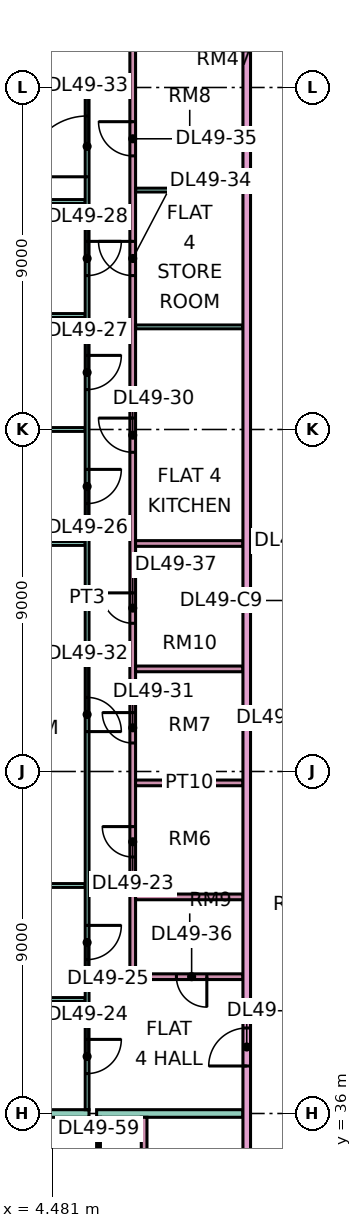
"""IFC4 building model, lengths in metres.
Left out: names, types, materials, properties, quantities, classifications, styles, units other than length and angle.
Written with IfcOpenShell. Run it as: python <this file> out.ifc"""

import sys

from ifc_helpers import new_model, si_unit, direction, frame, frame_2d, origin, place, context, subcontext, project, spatial, rectangle, extrude, element, fill, save


model = new_model("IFC4")
c1 = context("Model", 3, precision=1e-05, world=origin(), true_north=direction((0.0, 1.0)))
c2 = subcontext(c1, "Body", "Model", "MODEL_VIEW")
j1 = project(units=[si_unit("LENGTHUNIT", "METRE"), si_unit("PLANEANGLEUNIT", "RADIAN")], contexts=[c1])
p1 = place(None, origin())
s1 = spatial("IfcSite", under=j1, at=p1, CompositionType="ELEMENT")
p2 = place(p1, origin())
s2 = spatial("IfcBuilding", under=s1, at=p2, CompositionType="ELEMENT")
p3 = place(p2, frame((0.0, 0.0, 211.65)))
s3 = spatial("IfcBuildingStorey", under=s2, at=p3, CompositionType="ELEMENT", Elevation=211.65)
for number, where, z_axis, x_axis in (
    (1, (-1.351, 54.0, 0.0), (0.0, 0.0, 1.0), (1.0, 0.0, 0.0)),
    (2, (-1.351, 57.0, 0.0), (0.0, 0.0, 1.0), (1.0, 0.0, 0.0)),
    (3, (-1.351, 60.0, 0.0), (0.0, 0.0, 1.0), (1.0, 0.0, 0.0)),
):
    element("IfcWall", number, at=place(p3, frame(where, z_axis=z_axis, x_axis=x_axis)), inside=s3, PredefinedType="PARTITIONING", context=c2, shape_type="SweptSolid", body=[
        extrude(rectangle(XDim=6.701, YDim=0.1, at=frame_2d((3.351, 0.0))), origin(), (0.0, 0.0, 1.0), 3.35),
    ])
p4 = place(p3, frame((0.0, 36.0, 0.0), z_axis=(0.0, 0.0, 1.0), x_axis=(1.0, 0.0, 0.0)))
e4 = element("IfcWall", 4, at=p4, inside=s3, PredefinedType="PARTITIONING", context=c2, shape_type="SweptSolid", body=[
    extrude(rectangle(XDim=5.45, YDim=0.2, at=frame_2d((2.725, 0.0))), origin(), (0.0, 0.0, 1.0), 3.35),
])
p5 = place(p3, frame((-1.35, 51.0, 0.0), z_axis=(0.0, 0.0, 1.0), x_axis=(1.0, 0.0, 0.0)))
e5 = element("IfcWall", 5, at=p5, inside=s3, PredefinedType="PARTITIONING", context=c2, shape_type="SweptSolid", body=[
    extrude(rectangle(XDim=6.7, YDim=0.1, at=frame_2d((3.35, 0.0))), origin(), (0.0, 0.0, 1.0), 3.35),
])
for number, where, z_axis, x_axis in (
    (6, (0.074, 39.0, 0.0), (0.0, 0.0, 1.0), (1.0, 0.0, 0.0)),
    (7, (0.074, 42.0, 0.0), (0.0, 0.0, 1.0), (1.0, 0.0, 0.0)),
):
    element("IfcWall", number, at=place(p3, frame(where, z_axis=z_axis, x_axis=x_axis)), inside=s3, PredefinedType="PARTITIONING", context=c2, shape_type="SweptSolid", body=[
        extrude(rectangle(XDim=5.276, YDim=0.1, at=frame_2d((2.638, 0.0))), origin(), (0.0, 0.0, 1.0), 3.35),
    ])
p6 = place(p3, frame((5.4, 36.1, 0.0), z_axis=(0.0, 0.0, 1.0), x_axis=(0.0, 1.0, 0.0)))
e8 = element("IfcWall", 8, at=p6, inside=s3, PredefinedType="PARTITIONING", context=c2, shape_type="SweptSolid", body=[
    extrude(rectangle(XDim=26.95, YDim=0.1, at=frame_2d((13.475, 0.0))), origin(), (0.0, 0.0, 1.0), 3.35),
])
p7 = place(p6, frame((0.95, 0.0, 0.0)))
e9 = element("IfcOpeningElement", 9, at=p7, cuts=e8, PredefinedType="OPENING", context=c2, shape_type="SweptSolid", body=[
    extrude(rectangle(XDim=0.9, YDim=2.1, at=frame_2d((0.45, 1.05))), frame((0.0, 0.06, 0.0), z_axis=(0.0, -1.0, 0.0), x_axis=(1.0, 0.0, 0.0)), (0.0, 0.0, 1.0), 0.12),
])
p8 = place(p6, frame((3.95, 0.0, 0.0)))
e10 = element("IfcOpeningElement", 10, at=p8, cuts=e8, PredefinedType="OPENING", context=c2, shape_type="SweptSolid", body=[
    extrude(rectangle(XDim=0.9, YDim=2.1, at=frame_2d((0.45, 1.05))), frame((0.0, 0.06, 0.0), z_axis=(0.0, -1.0, 0.0), x_axis=(1.0, 0.0, 0.0)), (0.0, 0.0, 1.0), 0.12),
])
p9 = place(p6, frame((15.95, 0.0, 0.0)))
e11 = element("IfcOpeningElement", 11, at=p9, cuts=e8, PredefinedType="OPENING", context=c2, shape_type="SweptSolid", body=[
    extrude(rectangle(XDim=0.9, YDim=2.1, at=frame_2d((0.45, 1.05))), frame((0.0, 0.06, 0.0), z_axis=(0.0, -1.0, 0.0), x_axis=(1.0, 0.0, 0.0)), (0.0, 0.0, 1.0), 0.12),
])
p10 = place(p6, frame((18.95, 0.0, 0.0)))
e12 = element("IfcOpeningElement", 12, at=p10, cuts=e8, PredefinedType="OPENING", context=c2, shape_type="SweptSolid", body=[
    extrude(rectangle(XDim=0.9, YDim=2.1, at=frame_2d((0.45, 1.05))), frame((0.0, 0.06, 0.0), z_axis=(0.0, -1.0, 0.0), x_axis=(1.0, 0.0, 0.0)), (0.0, 0.0, 1.0), 0.12),
])
p11 = place(p6, frame((21.95, 0.0, 0.0)))
e13 = element("IfcOpeningElement", 13, at=p11, cuts=e8, PredefinedType="OPENING", context=c2, shape_type="SweptSolid", body=[
    extrude(rectangle(XDim=0.9, YDim=2.1, at=frame_2d((0.45, 1.05))), frame((0.0, 0.06, 0.0), z_axis=(0.0, -1.0, 0.0), x_axis=(1.0, 0.0, 0.0)), (0.0, 0.0, 1.0), 0.12),
])
p12 = place(p6, frame((9.95, 0.0, 0.0)))
e14 = element("IfcOpeningElement", 14, at=p12, cuts=e8, PredefinedType="OPENING", context=c2, shape_type="SweptSolid", body=[
    extrude(rectangle(XDim=0.9, YDim=2.1, at=frame_2d((0.45, 1.05))), frame((0.0, 0.06, 0.0), z_axis=(0.0, -1.0, 0.0), x_axis=(1.0, 0.0, 0.0)), (0.0, 0.0, 1.0), 0.12),
])
p13 = place(p6, frame((24.55, 0.0, 0.0)))
e15 = element("IfcOpeningElement", 15, at=p13, cuts=e8, PredefinedType="OPENING", context=c2, shape_type="SweptSolid", body=[
    extrude(rectangle(XDim=1.6, YDim=2.1, at=frame_2d((0.8, 1.05))), frame((0.0, 0.06, 0.0), z_axis=(0.0, -1.0, 0.0), x_axis=(1.0, 0.0, 0.0)), (0.0, 0.0, 1.0), 0.12),
])
p14 = place(p3, frame((5.45, 63.0, 0.0), z_axis=(0.0, 0.0, 1.0), x_axis=(1.0, 0.0, 0.0)))
e16 = element("IfcWall", 16, at=p14, inside=s3, PredefinedType="PARTITIONING", context=c2, shape_type="SweptSolid", body=[
    extrude(rectangle(XDim=0.55, YDim=0.1, at=frame_2d((0.275, 0.0))), origin(), (0.0, 0.0, 1.0), 3.35),
])
p15 = place(p3, frame((5.65, 36.0, 0.0), z_axis=(0.0, 0.0, 1.0), x_axis=(1.0, 0.0, 0.0)))
e17 = element("IfcWall", 17, at=p15, inside=s3, PredefinedType="PARTITIONING", context=c2, shape_type="SweptSolid", body=[
    extrude(rectangle(XDim=3.85, YDim=0.2, at=frame_2d((1.925, 0.0))), origin(), (0.0, 0.0, 1.0), 3.35),
])
p16 = place(p3, frame((5.7, 29.95, 0.0), z_axis=(0.0, 0.0, 1.0), x_axis=(0.0, 1.0, 0.0)))
e18 = element("IfcWall", 18, at=p16, inside=s3, PredefinedType="PARTITIONING", context=c2, shape_type="SweptSolid", body=[
    extrude(rectangle(XDim=5.95, YDim=0.1, at=frame_2d((2.975, 0.0))), origin(), (0.0, 0.0, 1.0), 3.35),
])
p17 = place(p16, frame((1.1, 0.0, 0.0)))
e19 = element("IfcOpeningElement", 19, at=p17, cuts=e18, PredefinedType="OPENING", context=c2, shape_type="SweptSolid", body=[
    extrude(rectangle(XDim=0.9, YDim=2.1, at=frame_2d((0.45, 1.05))), frame((0.0, 0.06, 0.0), z_axis=(0.0, -1.0, 0.0), x_axis=(1.0, 0.0, 0.0)), (0.0, 0.0, 1.0), 0.12),
])
p18 = place(p16, frame((4.1, 0.0, 0.0)))
e20 = element("IfcOpeningElement", 20, at=p18, cuts=e18, PredefinedType="OPENING", context=c2, shape_type="SweptSolid", body=[
    extrude(rectangle(XDim=0.9, YDim=2.1, at=frame_2d((0.45, 1.05))), frame((0.0, 0.06, 0.0), z_axis=(0.0, -1.0, 0.0), x_axis=(1.0, 0.0, 0.0)), (0.0, 0.0, 1.0), 0.12),
])
p19 = place(p3, frame((6.6, 39.525, 0.0), z_axis=(0.0, 0.0, 1.0), x_axis=(0.0, 1.0, 0.0)))
e21 = element("IfcWall", 21, at=p19, inside=s3, PredefinedType="PARTITIONING", context=c2, shape_type="SweptSolid", body=[
    extrude(rectangle(XDim=24.825, YDim=0.15, at=frame_2d((12.413, 0.0))), origin(), (0.0, 0.0, 1.0), 3.35),
])
p20 = place(p19, frame((3.225, 0.0, 0.0)))
e22 = element("IfcOpeningElement", 22, at=p20, cuts=e21, PredefinedType="OPENING", context=c2, shape_type="SweptSolid", body=[
    extrude(rectangle(XDim=0.8, YDim=2.1, at=frame_2d((0.4, 1.05))), frame((0.0, 0.085, 0.0), z_axis=(0.0, -1.0, 0.0), x_axis=(1.0, 0.0, 0.0)), (0.0, 0.0, 1.0), 0.17),
])
p21 = place(p19, frame((13.875, 0.0, 0.0)))
e23 = element("IfcOpeningElement", 23, at=p21, cuts=e21, PredefinedType="OPENING", context=c2, shape_type="SweptSolid", body=[
    extrude(rectangle(XDim=0.9, YDim=2.1, at=frame_2d((0.45, 1.05))), frame((0.0, 0.085, 0.0), z_axis=(0.0, -1.0, 0.0), x_axis=(1.0, 0.0, 0.0)), (0.0, 0.0, 1.0), 0.17),
])
p22 = place(p19, frame((6.225, 0.0, 0.0)))
e24 = element("IfcOpeningElement", 24, at=p22, cuts=e21, PredefinedType="OPENING", context=c2, shape_type="SweptSolid", body=[
    extrude(rectangle(XDim=0.8, YDim=2.1, at=frame_2d((0.4, 1.05))), frame((0.0, 0.085, 0.0), z_axis=(0.0, -1.0, 0.0), x_axis=(1.0, 0.0, 0.0)), (0.0, 0.0, 1.0), 0.17),
])
p23 = place(p19, frame((18.525, 0.0, 0.0)))
e25 = element("IfcOpeningElement", 25, at=p23, cuts=e21, PredefinedType="OPENING", context=c2, shape_type="SweptSolid", body=[
    extrude(rectangle(XDim=0.9, YDim=2.1, at=frame_2d((0.45, 1.05))), frame((0.0, 0.085, 0.0), z_axis=(0.0, -1.0, 0.0), x_axis=(1.0, 0.0, 0.0)), (0.0, 0.0, 1.0), 0.17),
])
p24 = place(p19, frame((21.675, 0.0, 0.0)))
e26 = element("IfcOpeningElement", 26, at=p24, cuts=e21, PredefinedType="OPENING", context=c2, shape_type="SweptSolid", body=[
    extrude(rectangle(XDim=0.9, YDim=2.1, at=frame_2d((0.45, 1.05))), frame((0.0, 0.085, 0.0), z_axis=(0.0, -1.0, 0.0), x_axis=(1.0, 0.0, 0.0)), (0.0, 0.0, 1.0), 0.17),
])
p25 = place(p19, frame((9.375, 0.0, 0.0)))
e27 = element("IfcOpeningElement", 27, at=p25, cuts=e21, PredefinedType="OPENING", context=c2, shape_type="SweptSolid", body=[
    extrude(rectangle(XDim=0.8, YDim=2.1, at=frame_2d((0.4, 1.05))), frame((0.0, 0.085, 0.0), z_axis=(0.0, -1.0, 0.0), x_axis=(1.0, 0.0, 0.0)), (0.0, 0.0, 1.0), 0.17),
])
p26 = place(p3, frame((6.675, 39.6, 0.0), z_axis=(0.0, 0.0, 1.0), x_axis=(1.0, 0.0, 0.0)))
e28 = element("IfcWall", 28, at=p26, inside=s3, PredefinedType="PARTITIONING", context=c2, shape_type="SweptSolid", body=[
    extrude(rectangle(XDim=2.825, YDim=0.15, at=frame_2d((1.413, 0.0))), origin(), (0.0, 0.0, 1.0), 3.35),
])
p27 = place(p26, frame((1.075, 0.0, 0.0)))
e29 = element("IfcOpeningElement", 29, at=p27, cuts=e28, PredefinedType="OPENING", context=c2, shape_type="SweptSolid", body=[
    extrude(rectangle(XDim=0.8, YDim=2.1, at=frame_2d((0.4, 1.05))), frame((0.0, 0.085, 0.0), z_axis=(0.0, -1.0, 0.0), x_axis=(1.0, 0.0, 0.0)), (0.0, 0.0, 1.0), 0.17),
])
for number, where, z_axis, x_axis in (
    (30, (6.675, 41.7, 0.0), (0.0, 0.0, 1.0), (1.0, 0.0, 0.0)),
    (31, (6.675, 44.7, 0.0), (0.0, 0.0, 1.0), (1.0, 0.0, 0.0)),
    (32, (6.675, 47.7, 0.0), (0.0, 0.0, 1.0), (1.0, 0.0, 0.0)),
    (33, (6.675, 51.0, 0.0), (0.0, 0.0, 1.0), (1.0, 0.0, 0.0)),
):
    element("IfcWall", number, at=place(p3, frame(where, z_axis=z_axis, x_axis=x_axis)), inside=s3, PredefinedType="PARTITIONING", context=c2, shape_type="SweptSolid", body=[
        extrude(rectangle(XDim=2.825, YDim=0.15, at=frame_2d((1.413, 0.0))), origin(), (0.0, 0.0, 1.0), 3.35),
    ])
for number, where, z_axis, x_axis in (
    (34, (6.675, 56.7, 0.0), (0.0, 0.0, 1.0), (1.0, 0.0, 0.0)),
    (35, (6.675, 60.3, 0.0), (0.0, 0.0, 1.0), (1.0, 0.0, 0.0)),
):
    element("IfcWall", number, at=place(p3, frame(where, z_axis=z_axis, x_axis=x_axis)), inside=s3, PredefinedType="PARTITIONING", context=c2, shape_type="SweptSolid", body=[
        extrude(rectangle(XDim=2.825, YDim=0.1, at=frame_2d((1.413, 0.0))), origin(), (0.0, 0.0, 1.0), 3.35),
    ])
p28 = place(p3, frame((6.9, 27.225, 0.0), z_axis=(0.0, 0.0, 1.0), x_axis=(0.0, 1.0, 0.0)))
e36 = element("IfcWall", 36, at=p28, inside=s3, PredefinedType="PARTITIONING", context=c2, shape_type="SweptSolid", body=[
    extrude(rectangle(XDim=8.675, YDim=0.15, at=frame_2d((4.337, 0.0))), origin(), (0.0, 0.0, 1.0), 3.35),
])
p29 = place(p28, frame((1.125, 0.0, 0.0)))
e37 = element("IfcOpeningElement", 37, at=p29, cuts=e36, PredefinedType="OPENING", context=c2, shape_type="SweptSolid", body=[
    extrude(rectangle(XDim=0.8, YDim=2.1, at=frame_2d((0.4, 1.05))), frame((0.0, 0.085, 0.0), z_axis=(0.0, -1.0, 0.0), x_axis=(1.0, 0.0, 0.0)), (0.0, 0.0, 1.0), 0.17),
])
p30 = place(p28, frame((5.475, 0.0, 0.0)))
e38 = element("IfcOpeningElement", 38, at=p30, cuts=e36, PredefinedType="OPENING", context=c2, shape_type="SweptSolid", body=[
    extrude(rectangle(XDim=0.9, YDim=2.1, at=frame_2d((0.45, 1.05))), frame((0.0, 0.085, 0.0), z_axis=(0.0, -1.0, 0.0), x_axis=(1.0, 0.0, 0.0)), (0.0, 0.0, 1.0), 0.17),
])
p31 = place(p3, frame((9.6, 20.0, 0.0), z_axis=(0.0, 0.0, 1.0), x_axis=(0.0, 1.0, 0.0)))
e39 = element("IfcWall", 39, at=p31, inside=s3, PredefinedType="PARTITIONING", context=c2, shape_type="SweptSolid", body=[
    extrude(rectangle(XDim=44.35, YDim=0.2, at=frame_2d((22.175, 0.0))), origin(), (0.0, 0.0, 1.0), 3.35),
])
p32 = place(p31, frame((17.25, 0.0, 0.0)))
e40 = element("IfcOpeningElement", 40, at=p32, cuts=e39, PredefinedType="OPENING", context=c2, shape_type="SweptSolid", body=[
    extrude(rectangle(XDim=1.0, YDim=2.1, at=frame_2d((0.5, 1.05))), frame((0.0, 0.11, 0.0), z_axis=(0.0, -1.0, 0.0), x_axis=(1.0, 0.0, 0.0)), (0.0, 0.0, 1.0), 0.22),
])
p33 = place(p31, frame((0.6, 0.0, 0.0)))
e41 = element("IfcOpeningElement", 41, at=p33, cuts=e39, PredefinedType="OPENING", context=c2, shape_type="SweptSolid", body=[
    extrude(rectangle(XDim=1.2, YDim=2.1, at=frame_2d((0.6, 1.05))), frame((0.0, 0.11, 0.0), z_axis=(0.0, -1.0, 0.0), x_axis=(1.0, 0.0, 0.0)), (0.0, 0.0, 1.0), 0.22),
])
p34 = place(p31, frame((4.35, 0.0, 0.0)))
e42 = element("IfcOpeningElement", 42, at=p34, cuts=e39, PredefinedType="OPENING", context=c2, shape_type="SweptSolid", body=[
    extrude(rectangle(XDim=1.0, YDim=2.1, at=frame_2d((0.5, 1.05))), frame((0.0, 0.11, 0.0), z_axis=(0.0, -1.0, 0.0), x_axis=(1.0, 0.0, 0.0)), (0.0, 0.0, 1.0), 0.22),
])
p35 = place(p20, frame((0.8, 0.0, 0.0), z_axis=(0.0, 0.0, 1.0), x_axis=(-1.0, 0.0, 0.0)))
e43 = element("IfcDoor", 43, at=p35, inside=s3, OperationType="SINGLE_SWING_RIGHT", PredefinedType="DOOR", context=c2, shape_type="SweptSolid", body=[
    extrude(rectangle(XDim=0.8, YDim=2.1, at=frame_2d((0.4, 1.05))), frame((0.0, 0.025, 0.0), z_axis=(0.0, -1.0, 0.0), x_axis=(1.0, 0.0, 0.0)), (0.0, 0.0, 1.0), 0.05),
])
fill(e22, e43)
p36 = place(p7, origin())
e44 = element("IfcDoor", 44, at=p36, inside=s3, OperationType="SINGLE_SWING_RIGHT", PredefinedType="DOOR", context=c2, shape_type="SweptSolid", body=[
    extrude(rectangle(XDim=0.9, YDim=2.1, at=frame_2d((0.45, 1.05))), frame((0.0, 0.025, 0.0), z_axis=(0.0, -1.0, 0.0), x_axis=(1.0, 0.0, 0.0)), (0.0, 0.0, 1.0), 0.05),
])
fill(e9, e44)
p37 = place(p8, origin())
e45 = element("IfcDoor", 45, at=p37, inside=s3, OperationType="SINGLE_SWING_RIGHT", PredefinedType="DOOR", context=c2, shape_type="SweptSolid", body=[
    extrude(rectangle(XDim=0.9, YDim=2.1, at=frame_2d((0.45, 1.05))), frame((0.0, 0.025, 0.0), z_axis=(0.0, -1.0, 0.0), x_axis=(1.0, 0.0, 0.0)), (0.0, 0.0, 1.0), 0.05),
])
fill(e10, e45)
p38 = place(p9, origin())
e46 = element("IfcDoor", 46, at=p38, inside=s3, OperationType="SINGLE_SWING_RIGHT", PredefinedType="DOOR", context=c2, shape_type="SweptSolid", body=[
    extrude(rectangle(XDim=0.9, YDim=2.1, at=frame_2d((0.45, 1.05))), frame((0.0, 0.025, 0.0), z_axis=(0.0, -1.0, 0.0), x_axis=(1.0, 0.0, 0.0)), (0.0, 0.0, 1.0), 0.05),
])
fill(e11, e46)
p39 = place(p10, origin())
e47 = element("IfcDoor", 47, at=p39, inside=s3, OperationType="SINGLE_SWING_RIGHT", PredefinedType="DOOR", context=c2, shape_type="SweptSolid", body=[
    extrude(rectangle(XDim=0.9, YDim=2.1, at=frame_2d((0.45, 1.05))), frame((0.0, 0.025, 0.0), z_axis=(0.0, -1.0, 0.0), x_axis=(1.0, 0.0, 0.0)), (0.0, 0.0, 1.0), 0.05),
])
fill(e12, e47)
p40 = place(p11, origin())
e48 = element("IfcDoor", 48, at=p40, inside=s3, OperationType="SINGLE_SWING_RIGHT", PredefinedType="DOOR", context=c2, shape_type="SweptSolid", body=[
    extrude(rectangle(XDim=0.9, YDim=2.1, at=frame_2d((0.45, 1.05))), frame((0.0, 0.025, 0.0), z_axis=(0.0, -1.0, 0.0), x_axis=(1.0, 0.0, 0.0)), (0.0, 0.0, 1.0), 0.05),
])
fill(e13, e48)
p41 = place(p32, origin())
e49 = element("IfcDoor", 49, at=p41, inside=s3, OperationType="SINGLE_SWING_LEFT", PredefinedType="DOOR", context=c2, shape_type="SweptSolid", body=[
    extrude(rectangle(XDim=1.0, YDim=2.1, at=frame_2d((0.5, 1.05))), frame((0.0, 0.025, 0.0), z_axis=(0.0, -1.0, 0.0), x_axis=(1.0, 0.0, 0.0)), (0.0, 0.0, 1.0), 0.05),
])
fill(e40, e49)
p42 = place(p21, frame((0.9, 0.0, 0.0), z_axis=(0.0, 0.0, 1.0), x_axis=(-1.0, 0.0, 0.0)))
e50 = element("IfcDoor", 50, at=p42, inside=s3, OperationType="SINGLE_SWING_RIGHT", PredefinedType="DOOR", context=c2, shape_type="SweptSolid", body=[
    extrude(rectangle(XDim=0.9, YDim=2.1, at=frame_2d((0.45, 1.05))), frame((0.0, 0.025, 0.0), z_axis=(0.0, -1.0, 0.0), x_axis=(1.0, 0.0, 0.0)), (0.0, 0.0, 1.0), 0.05),
])
fill(e23, e50)
p43 = place(p22, frame((0.8, 0.0, 0.0), z_axis=(0.0, 0.0, 1.0), x_axis=(-1.0, 0.0, 0.0)))
e51 = element("IfcDoor", 51, at=p43, inside=s3, OperationType="SINGLE_SWING_RIGHT", PredefinedType="DOOR", context=c2, shape_type="SweptSolid", body=[
    extrude(rectangle(XDim=0.8, YDim=2.1, at=frame_2d((0.4, 1.05))), frame((0.0, 0.025, 0.0), z_axis=(0.0, -1.0, 0.0), x_axis=(1.0, 0.0, 0.0)), (0.0, 0.0, 1.0), 0.05),
])
fill(e24, e51)
p44 = place(p12, frame((0.9, 0.0, 0.0), z_axis=(0.0, 0.0, 1.0), x_axis=(-1.0, 0.0, 0.0)))
e52 = element("IfcDoor", 52, at=p44, inside=s3, OperationType="SINGLE_SWING_LEFT", PredefinedType="DOOR", context=c2, shape_type="SweptSolid", body=[
    extrude(rectangle(XDim=0.9, YDim=2.1, at=frame_2d((0.45, 1.05))), frame((0.0, 0.025, 0.0), z_axis=(0.0, -1.0, 0.0), x_axis=(1.0, 0.0, 0.0)), (0.0, 0.0, 1.0), 0.05),
])
fill(e14, e52)
p45 = place(p13, origin())
e53 = element("IfcDoor", 53, at=p45, inside=s3, OperationType="DOUBLE_DOOR_SINGLE_SWING", PredefinedType="DOOR", context=c2, shape_type="SweptSolid", body=[
    extrude(rectangle(XDim=1.6, YDim=2.1, at=frame_2d((0.8, 1.05))), frame((0.0, 0.025, 0.0), z_axis=(0.0, -1.0, 0.0), x_axis=(1.0, 0.0, 0.0)), (0.0, 0.0, 1.0), 0.05),
])
fill(e15, e53)
p46 = place(p23, frame((0.9, 0.0, 0.0), z_axis=(0.0, 0.0, 1.0), x_axis=(-1.0, 0.0, 0.0)))
e54 = element("IfcDoor", 54, at=p46, inside=s3, OperationType="SINGLE_SWING_RIGHT", PredefinedType="DOOR", context=c2, shape_type="SweptSolid", body=[
    extrude(rectangle(XDim=0.9, YDim=2.1, at=frame_2d((0.45, 1.05))), frame((0.0, 0.025, 0.0), z_axis=(0.0, -1.0, 0.0), x_axis=(1.0, 0.0, 0.0)), (0.0, 0.0, 1.0), 0.05),
])
fill(e25, e54)
p47 = place(p24, frame((0.9, 0.0, 0.0), z_axis=(0.0, 0.0, 1.0), x_axis=(-1.0, 0.0, 0.0)))
e55 = element("IfcDoor", 55, at=p47, inside=s3, OperationType="SINGLE_SWING_RIGHT", PredefinedType="DOOR", context=c2, shape_type="SweptSolid", body=[
    extrude(rectangle(XDim=0.9, YDim=2.1, at=frame_2d((0.45, 1.05))), frame((0.0, 0.025, 0.0), z_axis=(0.0, -1.0, 0.0), x_axis=(1.0, 0.0, 0.0)), (0.0, 0.0, 1.0), 0.05),
])
fill(e26, e55)
p48 = place(p27, origin())
e56 = element("IfcDoor", 56, at=p48, inside=s3, OperationType="SINGLE_SWING_RIGHT", PredefinedType="DOOR", context=c2, shape_type="SweptSolid", body=[
    extrude(rectangle(XDim=0.8, YDim=2.1, at=frame_2d((0.4, 1.05))), frame((0.0, 0.025, 0.0), z_axis=(0.0, -1.0, 0.0), x_axis=(1.0, 0.0, 0.0)), (0.0, 0.0, 1.0), 0.05),
])
fill(e29, e56)
p49 = place(p25, frame((0.8, 0.0, 0.0), z_axis=(0.0, 0.0, 1.0), x_axis=(-1.0, 0.0, 0.0)))
e57 = element("IfcDoor", 57, at=p49, inside=s3, OperationType="SINGLE_SWING_RIGHT", PredefinedType="DOOR", context=c2, shape_type="SweptSolid", body=[
    extrude(rectangle(XDim=0.8, YDim=2.1, at=frame_2d((0.4, 1.05))), frame((0.0, 0.025, 0.0), z_axis=(0.0, -1.0, 0.0), x_axis=(1.0, 0.0, 0.0)), (0.0, 0.0, 1.0), 0.05),
])
fill(e27, e57)
save(model, sys.argv[1])
